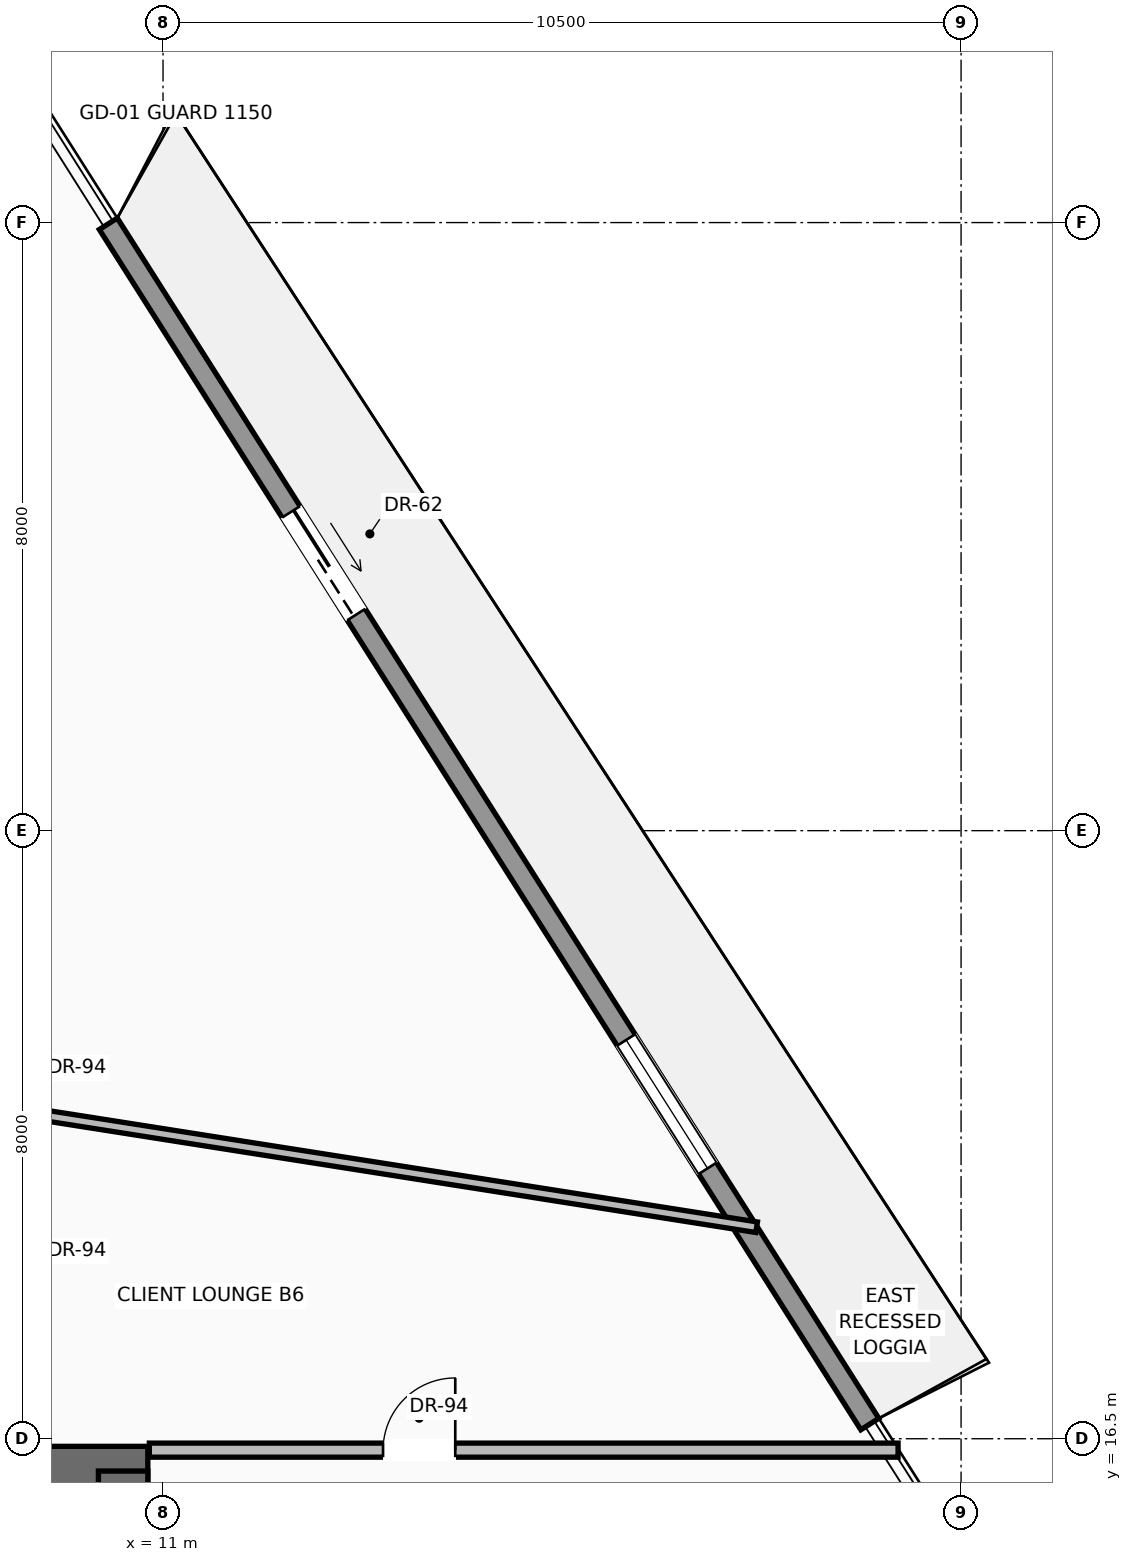
"""IFC4 building model, lengths in metres.
Left out: names, types, materials, properties, quantities, classifications, styles, units other than length and angle.
Written with IfcOpenShell. Run it as: python <this file> out.ifc"""

import sys

from ifc_helpers import new_model, si_unit, direction, frame, frame_2d, origin, place, context, subcontext, project, spatial, rectangle, extrude, source, transform, mapped, element, fill, save


model = new_model("IFC4")
c1 = context("Model", 3, precision=1e-05, world=origin(), true_north=direction((0.0, 1.0)))
c2 = subcontext(c1, "Body", "Model", "MODEL_VIEW")
j1 = project(units=[si_unit("LENGTHUNIT", "METRE"), si_unit("PLANEANGLEUNIT", "RADIAN")], contexts=[c1])
p1 = place(None, origin())
s1 = spatial("IfcSite", under=j1, at=p1, CompositionType="ELEMENT")
p2 = place(p1, origin())
s2 = spatial("IfcBuilding", under=s1, at=p2, CompositionType="ELEMENT")
p3 = place(p2, frame((0.0, 0.0, 174.7)))
s3 = spatial("IfcBuildingStorey", under=s2, at=p3, CompositionType="ELEMENT", Elevation=174.7)
p4 = place(p3, frame((-10.8, 16.075, 0.0), z_axis=(0.0, 0.0, 1.0), x_axis=(1.0, 0.0, 0.0)))
e1 = element("IfcWall", 1, at=p4, inside=s3, PredefinedType="SHEAR", context=c2, shape_type="SweptSolid", body=[
    extrude(rectangle(XDim=21.6, YDim=0.65, at=frame_2d((10.8, 0.0))), origin(), (0.0, 0.0, 1.0), 3.47),
])
p5 = place(p4, frame((3.37, 0.0, 0.0)))
e2 = element("IfcOpeningElement", 2, at=p5, cuts=e1, PredefinedType="OPENING", context=c2, shape_type="SweptSolid", body=[
    extrude(rectangle(XDim=1.3, YDim=2.3, at=frame_2d((0.65, 1.15))), frame((0.0, 0.335, 0.0), z_axis=(0.0, -1.0, 0.0), x_axis=(1.0, 0.0, 0.0)), (0.0, 0.0, 1.0), 0.67),
])
p6 = place(p4, frame((9.8, 0.0, 0.0)))
e3 = element("IfcOpeningElement", 3, at=p6, cuts=e1, PredefinedType="OPENING", context=c2, shape_type="SweptSolid", body=[
    extrude(rectangle(XDim=2.0, YDim=2.4, at=frame_2d((1.0, 1.2))), frame((0.0, 0.335, 0.0), z_axis=(0.0, -1.0, 0.0), x_axis=(1.0, 0.0, 0.0)), (0.0, 0.0, 1.0), 0.67),
])
p7 = place(p3, frame((10.475, 0.525, 0.0), z_axis=(0.0, 0.0, 1.0), x_axis=(0.0, 1.0, 0.0)))
e4 = element("IfcWall", 4, at=p7, inside=s3, PredefinedType="SHEAR", context=c2, shape_type="SweptSolid", body=[
    extrude(rectangle(XDim=15.55, YDim=0.65, at=frame_2d((7.775, 0.0))), origin(), (0.0, 0.0, 1.0), 3.47),
])
p8 = place(p3, frame((10.28, 32.484, 0.0), z_axis=(0.0, 0.0, 1.0), x_axis=(0.53575660665, -0.844372464278, 0.0)))
e5 = element("IfcWall", 5, at=p8, inside=s3, PredefinedType="SOLIDWALL", context=c2, shape_type="SweptSolid", body=[
    extrude(rectangle(XDim=18.701, YDim=0.28, at=frame_2d((9.351, 0.0))), origin(), (0.0, 0.0, 1.0), 3.05),
])
p9 = place(p8, frame((4.488, 0.0, 0.0)))
e6 = element("IfcOpeningElement", 6, at=p9, cuts=e5, PredefinedType="OPENING", context=c2, shape_type="SweptSolid", body=[
    extrude(rectangle(XDim=1.6, YDim=2.35, at=frame_2d((0.8, 1.175))), frame((0.0, 0.15, 0.0), z_axis=(0.0, -1.0, 0.0), x_axis=(1.0, 0.0, 0.0)), (0.0, 0.0, 1.0), 0.3),
])
p10 = place(p8, frame((12.717, 0.0, 0.9)))
e7 = element("IfcOpeningElement", 7, at=p10, cuts=e5, PredefinedType="OPENING", context=c2, shape_type="SweptSolid", body=[
    extrude(rectangle(XDim=2.0, YDim=1.85, at=frame_2d((1.0, 0.925))), frame((0.0, 0.15, 0.0), z_axis=(0.0, -1.0, 0.0), x_axis=(1.0, 0.0, 0.0)), (0.0, 0.0, 1.0), 0.3),
])
p11 = place(p3, frame((10.82, 16.35, 0.0), z_axis=(0.0, 0.0, 1.0), x_axis=(1.0, 0.0, 0.0)))
e8 = element("IfcWall", 8, at=p11, inside=s3, PredefinedType="PARTITIONING", context=c2, shape_type="SweptSolid", body=[
    extrude(rectangle(XDim=9.851, YDim=0.185, at=frame_2d((4.926, 0.0))), origin(), (0.0, 0.0, 1.0), 3.462),
])
p12 = place(p11, frame((3.075, 0.0, 0.0)))
e9 = element("IfcOpeningElement", 9, at=p12, cuts=e8, PredefinedType="OPENING", context=c2, shape_type="SweptSolid", body=[
    extrude(rectangle(XDim=0.95, YDim=2.2, at=frame_2d((0.475, 1.1))), frame((0.0, 0.103, 0.0), z_axis=(0.0, -1.0, 0.0), x_axis=(1.0, 0.0, 0.0)), (0.0, 0.0, 1.0), 0.205),
])
p13 = place(p3, frame((9.15, 20.8, 0.0), z_axis=(0.0, 0.0, 1.0), x_axis=(0.987888554184, -0.155165087929, 0.0)))
e10 = element("IfcWall", 10, at=p13, inside=s3, PredefinedType="PARTITIONING", context=c2, shape_type="SweptSolid", body=[
    extrude(rectangle(XDim=9.779, YDim=0.14, at=frame_2d((4.889, 0.0))), origin(), (0.0, 0.0, 1.0), 3.049),
])
m1 = source(origin(), c2, "Body", "SweptSolid", [
    extrude(rectangle(XDim=1.6, YDim=2.35, at=frame_2d((0.8, 1.175))), frame((0.0, 0.025, 0.0), z_axis=(0.0, -1.0, 0.0), x_axis=(1.0, 0.0, 0.0)), (0.0, 0.0, 1.0), 0.05),
])
p14 = place(p9, origin())
e11 = element("IfcDoor", 11, at=p14, inside=s3, OperationType="SLIDING_TO_RIGHT", PredefinedType="DOOR", context=c2, shape_type="MappedRepresentation", body=[
    mapped(m1, transform((0.0, 0.0, 0.0), scale=1.0)),
])
fill(e6, e11)
m2 = source(origin(), c2, "Body", "SweptSolid", [
    extrude(rectangle(XDim=2.0, YDim=1.85, at=frame_2d((1.0, 0.925))), frame((0.0, 0.03, 0.0), z_axis=(0.0, -1.0, 0.0), x_axis=(1.0, 0.0, 0.0)), (0.0, 0.0, 1.0), 0.06),
])
p15 = place(p10, origin())
e12 = element("IfcWindow", 12, at=p15, inside=s3, PartitioningType="SINGLE_PANEL", PredefinedType="WINDOW", context=c2, shape_type="MappedRepresentation", body=[
    mapped(m2, transform((0.0, 0.0, 0.0), scale=1.0)),
])
fill(e7, e12)
m3 = source(origin(), c2, "Body", "SweptSolid", [
    extrude(rectangle(XDim=0.95, YDim=2.2, at=frame_2d((0.475, 1.1))), frame((0.0, 0.025, 0.0), z_axis=(0.0, -1.0, 0.0), x_axis=(1.0, 0.0, 0.0)), (0.0, 0.0, 1.0), 0.05),
])
p16 = place(p12, origin())
e13 = element("IfcDoor", 13, at=p16, inside=s3, OperationType="SINGLE_SWING_RIGHT", PredefinedType="DOOR", context=c2, shape_type="MappedRepresentation", body=[
    mapped(m3, transform((0.0, 0.0, 0.0), scale=1.0)),
])
fill(e9, e13)
save(model, sys.argv[1])
